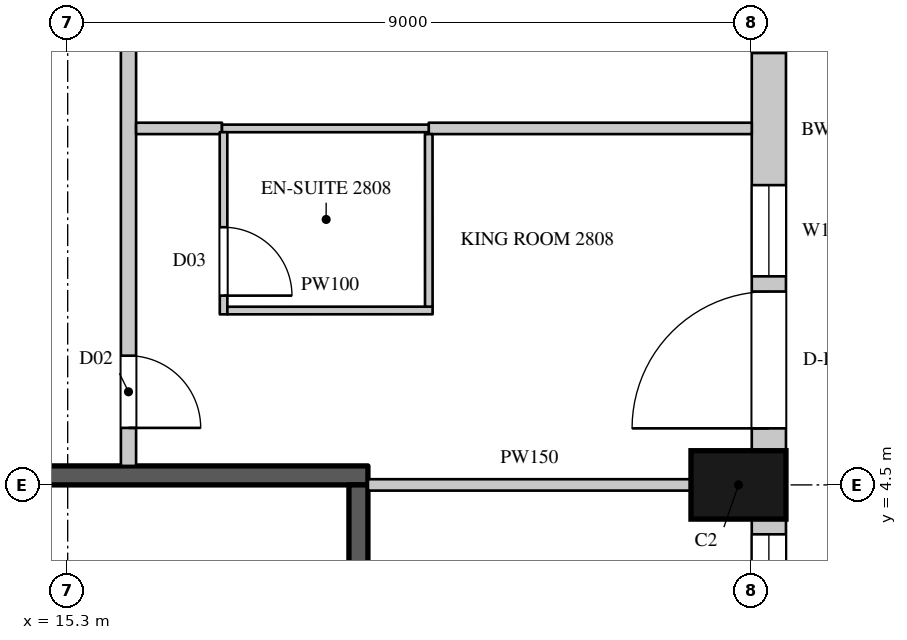
"""IFC4 building model, lengths in metres.
Left out: names, types, materials, properties, quantities, classifications, styles, units other than length and angle.
Written with IfcOpenShell. Run it as: python <this file> out.ifc"""

import sys

from ifc_helpers import new_model, si_unit, direction, frame, frame_2d, origin, origin_2d, place, context, subcontext, project, spatial, rectangle, extrude, element, fill, save


model = new_model("IFC4")
c1 = context("Model", 3, precision=1e-05, world=origin(), true_north=direction((0.0, 1.0)))
c2 = subcontext(c1, "Body", "Model", "MODEL_VIEW")
j1 = project(units=[si_unit("LENGTHUNIT", "METRE"), si_unit("PLANEANGLEUNIT", "RADIAN")], contexts=[c1])
p1 = place(None, origin())
s1 = spatial("IfcSite", under=j1, at=p1, CompositionType="ELEMENT")
p2 = place(p1, origin())
s2 = spatial("IfcBuilding", under=s1, at=p2, CompositionType="ELEMENT")
p3 = place(p2, frame((0.0, 0.0, 131.1)))
s3 = spatial("IfcBuildingStorey", under=s2, at=p3, CompositionType="ELEMENT", Elevation=131.1)
p4 = place(p3, frame((24.125, 4.5, 0.0), z_axis=(0.0, 0.0, 1.0), x_axis=(0.0, 1.0, 0.0)))
e1 = element("IfcColumn", 1, at=p4, inside=s3, PredefinedType="COLUMN", context=c2, shape_type="SweptSolid", body=[
    extrude(rectangle(XDim=0.9, YDim=1.25, at=origin_2d()), origin(), (0.0, 0.0, 1.0), 3.6),
])
p5 = place(p3, frame((24.525, -4.05, 0.0), z_axis=(0.0, 0.0, 1.0), x_axis=(0.0, 1.0, 0.0)))
e2 = element("IfcWall", 2, at=p5, inside=s3, PredefinedType="SOLIDWALL", context=c2, shape_type="SweptSolid", body=[
    extrude(rectangle(XDim=8.1, YDim=0.45, at=frame_2d((4.05, 0.0))), origin(), (0.0, 0.0, 1.0), 3.3),
])
p6 = place(p5, frame((0.2, 0.0, 0.0)))
e3 = element("IfcOpeningElement", 3, at=p6, cuts=e2, PredefinedType="OPENING", context=c2, shape_type="SweptSolid", body=[
    extrude(rectangle(XDim=1.8, YDim=2.4, at=frame_2d((0.9, 1.2))), frame((0.0, 0.235, 0.0), z_axis=(0.0, -1.0, 0.0), x_axis=(1.0, 0.0, 0.0)), (0.0, 0.0, 1.0), 0.47),
])
p7 = place(p5, frame((2.2, 0.0, 1.05)))
e4 = element("IfcOpeningElement", 4, at=p7, cuts=e2, PredefinedType="OPENING", context=c2, shape_type="SweptSolid", body=[
    extrude(rectangle(XDim=1.2, YDim=2.0, at=frame_2d((0.6, 1.0))), frame((0.0, 0.235, 0.0), z_axis=(0.0, -1.0, 0.0), x_axis=(1.0, 0.0, 0.0)), (0.0, 0.0, 1.0), 0.47),
])
p8 = place(p5, frame((4.7, 0.0, 0.0)))
e5 = element("IfcOpeningElement", 5, at=p8, cuts=e2, PredefinedType="OPENING", context=c2, shape_type="SweptSolid", body=[
    extrude(rectangle(XDim=1.8, YDim=2.4, at=frame_2d((0.9, 1.2))), frame((0.0, 0.235, 0.0), z_axis=(0.0, -1.0, 0.0), x_axis=(1.0, 0.0, 0.0)), (0.0, 0.0, 1.0), 0.47),
])
p9 = place(p5, frame((6.7, 0.0, 1.05)))
e6 = element("IfcOpeningElement", 6, at=p9, cuts=e2, PredefinedType="OPENING", context=c2, shape_type="SweptSolid", body=[
    extrude(rectangle(XDim=1.2, YDim=2.0, at=frame_2d((0.6, 1.0))), frame((0.0, 0.235, 0.0), z_axis=(0.0, -1.0, 0.0), x_axis=(1.0, 0.0, 0.0)), (0.0, 0.0, 1.0), 0.47),
])
p10 = place(p3, frame((24.525, 4.95, 0.0), z_axis=(0.0, 0.0, 1.0), x_axis=(0.0, 1.0, 0.0)))
e7 = element("IfcWall", 7, at=p10, inside=s3, PredefinedType="SOLIDWALL", context=c2, shape_type="SweptSolid", body=[
    extrude(rectangle(XDim=8.439, YDim=0.45, at=frame_2d((4.219, 0.0))), origin(), (0.0, 0.0, 1.0), 3.3),
])
p11 = place(p10, frame((0.294, 0.0, 0.0)))
e8 = element("IfcOpeningElement", 8, at=p11, cuts=e7, PredefinedType="OPENING", context=c2, shape_type="SweptSolid", body=[
    extrude(rectangle(XDim=1.8, YDim=2.4, at=frame_2d((0.9, 1.2))), frame((0.0, 0.235, 0.0), z_axis=(0.0, -1.0, 0.0), x_axis=(1.0, 0.0, 0.0)), (0.0, 0.0, 1.0), 0.47),
])
p12 = place(p10, frame((2.294, 0.0, 1.05)))
e9 = element("IfcOpeningElement", 9, at=p12, cuts=e7, PredefinedType="OPENING", context=c2, shape_type="SweptSolid", body=[
    extrude(rectangle(XDim=1.2, YDim=2.0, at=frame_2d((0.6, 1.0))), frame((0.0, 0.235, 0.0), z_axis=(0.0, -1.0, 0.0), x_axis=(1.0, 0.0, 0.0)), (0.0, 0.0, 1.0), 0.47),
])
p13 = place(p10, frame((5.232, 0.0, 1.05)))
e10 = element("IfcOpeningElement", 10, at=p13, cuts=e7, PredefinedType="OPENING", context=c2, shape_type="SweptSolid", body=[
    extrude(rectangle(XDim=2.7, YDim=2.0, at=frame_2d((1.35, 1.0))), frame((0.0, 0.235, 0.0), z_axis=(0.0, -1.0, 0.0), x_axis=(1.0, 0.0, 0.0)), (0.0, 0.0, 1.0), 0.47),
])
p14 = place(p3, frame((16.1, 4.75, 0.0), z_axis=(0.0, 0.0, 1.0), x_axis=(0.0, 1.0, 0.0)))
e11 = element("IfcWall", 11, at=p14, inside=s3, PredefinedType="PARTITIONING", context=c2, shape_type="SweptSolid", body=[
    extrude(rectangle(XDim=12.65, YDim=0.2, at=frame_2d((6.325, 0.0))), origin(), (0.0, 0.0, 1.0), 3.3),
])
p15 = place(p14, frame((0.5, 0.0, 0.0)))
e12 = element("IfcOpeningElement", 12, at=p15, cuts=e11, PredefinedType="OPENING", context=c2, shape_type="SweptSolid", body=[
    extrude(rectangle(XDim=0.95, YDim=2.2, at=frame_2d((0.475, 1.1))), frame((0.0, 0.11, 0.0), z_axis=(0.0, -1.0, 0.0), x_axis=(1.0, 0.0, 0.0)), (0.0, 0.0, 1.0), 0.22),
])
p16 = place(p14, frame((6.9, 0.0, 0.0)))
e13 = element("IfcOpeningElement", 13, at=p16, cuts=e11, PredefinedType="OPENING", context=c2, shape_type="SweptSolid", body=[
    extrude(rectangle(XDim=0.95, YDim=2.2, at=frame_2d((0.475, 1.1))), frame((0.0, 0.11, 0.0), z_axis=(0.0, -1.0, 0.0), x_axis=(1.0, 0.0, 0.0)), (0.0, 0.0, 1.0), 0.22),
])
p17 = place(p3, frame((16.2, 9.19, 0.0), z_axis=(0.0, 0.0, 1.0), x_axis=(1.0, 0.0, 0.0)))
e14 = element("IfcWall", 14, at=p17, inside=s3, PredefinedType="PARTITIONING", context=c2, shape_type="SweptSolid", body=[
    extrude(rectangle(XDim=1.13, YDim=0.15, at=frame_2d((0.565, 0.0))), origin(), (0.0, 0.0, 1.0), 2.65),
])
p18 = place(p3, frame((19.25, 4.5, 0.0), z_axis=(0.0, 0.0, 1.0), x_axis=(1.0, 0.0, 0.0)))
e15 = element("IfcWall", 15, at=p18, inside=s3, PredefinedType="PARTITIONING", context=c2, shape_type="SweptSolid", body=[
    extrude(rectangle(XDim=4.25, YDim=0.15, at=frame_2d((2.125, 0.0))), origin(), (0.0, 0.0, 1.0), 3.3),
])
p19 = place(p3, frame((20.05, 9.19, 0.0), z_axis=(0.0, 0.0, 1.0), x_axis=(1.0, 0.0, 0.0)))
e16 = element("IfcWall", 16, at=p19, inside=s3, PredefinedType="PARTITIONING", context=c2, shape_type="SweptSolid", body=[
    extrude(rectangle(XDim=4.25, YDim=0.15, at=frame_2d((2.125, 0.0))), origin(), (0.0, 0.0, 1.0), 2.65),
])
p20 = place(p3, frame((14.55, 4.625, 0.0), z_axis=(0.0, 0.0, 1.0), x_axis=(1.0, 0.0, 0.0)))
e17 = element("IfcWall", 17, at=p20, inside=s3, PredefinedType="SHEAR", context=c2, shape_type="SweptSolid", body=[
    extrude(rectangle(XDim=4.7, YDim=0.25, at=frame_2d((2.35, 0.0))), origin(), (0.0, 0.0, 1.0), 3.3),
])
p21 = place(p3, frame((19.125, -4.5, 0.0), z_axis=(0.0, 0.0, 1.0), x_axis=(0.0, 1.0, 0.0)))
e18 = element("IfcWall", 18, at=p21, inside=s3, PredefinedType="SHEAR", context=c2, shape_type="SweptSolid", body=[
    extrude(rectangle(XDim=9.0, YDim=0.25, at=frame_2d((4.5, 0.0))), origin(), (0.0, 0.0, 1.0), 3.3),
])
p22 = place(p3, frame((17.33, 9.19, 0.0), z_axis=(0.0, 0.0, 1.0), x_axis=(1.0, 0.0, 0.0)))
e19 = element("IfcWall", 19, at=p22, inside=s3, PredefinedType="PARTITIONING", context=c2, shape_type="SweptSolid", body=[
    extrude(rectangle(XDim=2.72, YDim=0.1, at=frame_2d((1.36, 0.0))), origin(), (0.0, 0.0, 1.0), 2.65),
])
p23 = place(p3, frame((17.35, 9.14, 0.0), z_axis=(0.0, 0.0, 1.0), x_axis=(0.000407580973, -0.999999916939, 0.0)))
e20 = element("IfcWall", 20, at=p23, inside=s3, PredefinedType="PARTITIONING", context=c2, shape_type="SweptSolid", body=[
    extrude(rectangle(XDim=2.396, YDim=0.1, at=frame_2d((1.198, 0.0))), origin(), (0.0, 0.0, 1.0), 3.3),
])
p24 = place(p23, frame((1.25, 0.0, 0.0)))
e21 = element("IfcOpeningElement", 21, at=p24, cuts=e20, PredefinedType="OPENING", context=c2, shape_type="SweptSolid", body=[
    extrude(rectangle(XDim=0.9, YDim=2.2, at=frame_2d((0.45, 1.1))), frame((0.0, 0.06, 0.0), z_axis=(0.0, -1.0, 0.0), x_axis=(1.0, 0.0, 0.0)), (0.0, 0.0, 1.0), 0.12),
])
p25 = place(p3, frame((17.401, 6.794, 0.0), z_axis=(0.0, 0.0, 1.0), x_axis=(0.9999999346, 0.000361663629, 0.0)))
e22 = element("IfcWall", 22, at=p25, inside=s3, PredefinedType="PARTITIONING", context=c2, shape_type="SweptSolid", body=[
    extrude(rectangle(XDim=2.7, YDim=0.1, at=frame_2d((1.35, 0.0))), origin(), (0.0, 0.0, 1.0), 3.3),
])
p26 = place(p3, frame((20.05, 9.115, 0.0), z_axis=(0.0, 0.0, 1.0), x_axis=(0.000430200003, -0.999999907464, 0.0)))
e23 = element("IfcWall", 23, at=p26, inside=s3, PredefinedType="PARTITIONING", context=c2, shape_type="SweptSolid", body=[
    extrude(rectangle(XDim=2.27, YDim=0.1, at=frame_2d((1.135, 0.0))), origin(), (0.0, 0.0, 1.0), 3.3),
])
p27 = place(p9, origin())
e24 = element("IfcWindow", 24, at=p27, inside=s3, PartitioningType="SINGLE_PANEL", PredefinedType="WINDOW", context=c2, shape_type="SweptSolid", body=[
    extrude(rectangle(XDim=1.2, YDim=2.0, at=frame_2d((0.6, 1.0))), frame((0.0, 0.135, 0.0), z_axis=(0.0, -1.0, 0.0), x_axis=(1.0, 0.0, 0.0)), (0.0, 0.0, 1.0), 0.06),
])
fill(e6, e24)
p28 = place(p11, origin())
e25 = element("IfcDoor", 25, at=p28, inside=s3, OperationType="SLIDING_TO_LEFT", PredefinedType="DOOR", context=c2, shape_type="SweptSolid", body=[
    extrude(rectangle(XDim=1.8, YDim=2.4, at=frame_2d((0.9, 1.2))), frame((0.0, 0.13, 0.0), z_axis=(0.0, -1.0, 0.0), x_axis=(1.0, 0.0, 0.0)), (0.0, 0.0, 1.0), 0.05),
])
fill(e8, e25)
p29 = place(p12, origin())
e26 = element("IfcWindow", 26, at=p29, inside=s3, PartitioningType="SINGLE_PANEL", PredefinedType="WINDOW", context=c2, shape_type="SweptSolid", body=[
    extrude(rectangle(XDim=1.2, YDim=2.0, at=frame_2d((0.6, 1.0))), frame((0.0, 0.135, 0.0), z_axis=(0.0, -1.0, 0.0), x_axis=(1.0, 0.0, 0.0)), (0.0, 0.0, 1.0), 0.06),
])
fill(e9, e26)
p30 = place(p13, origin())
e27 = element("IfcWindow", 27, at=p30, inside=s3, PartitioningType="SINGLE_PANEL", PredefinedType="WINDOW", context=c2, shape_type="SweptSolid", body=[
    extrude(rectangle(XDim=2.7, YDim=2.0, at=frame_2d((1.35, 1.0))), frame((0.0, 0.135, 0.0), z_axis=(0.0, -1.0, 0.0), x_axis=(1.0, 0.0, 0.0)), (0.0, 0.0, 1.0), 0.06),
])
fill(e10, e27)
p31 = place(p15, origin())
e28 = element("IfcDoor", 28, at=p31, inside=s3, OperationType="SINGLE_SWING_RIGHT", PredefinedType="DOOR", context=c2, shape_type="SweptSolid", body=[
    extrude(rectangle(XDim=0.95, YDim=2.2, at=frame_2d((0.475, 1.1))), frame((0.0, 0.025, 0.0), z_axis=(0.0, -1.0, 0.0), x_axis=(1.0, 0.0, 0.0)), (0.0, 0.0, 1.0), 0.05),
])
fill(e12, e28)
p32 = place(p24, origin())
e29 = element("IfcDoor", 29, at=p32, inside=s3, OperationType="SINGLE_SWING_RIGHT", PredefinedType="DOOR", context=c2, shape_type="SweptSolid", body=[
    extrude(rectangle(XDim=0.9, YDim=2.2, at=frame_2d((0.45, 1.1))), frame((0.0, 0.025, 0.0), z_axis=(0.0, -1.0, 0.0), x_axis=(1.0, 0.0, 0.0)), (0.0, 0.0, 1.0), 0.05),
])
fill(e21, e29)
save(model, sys.argv[1])
